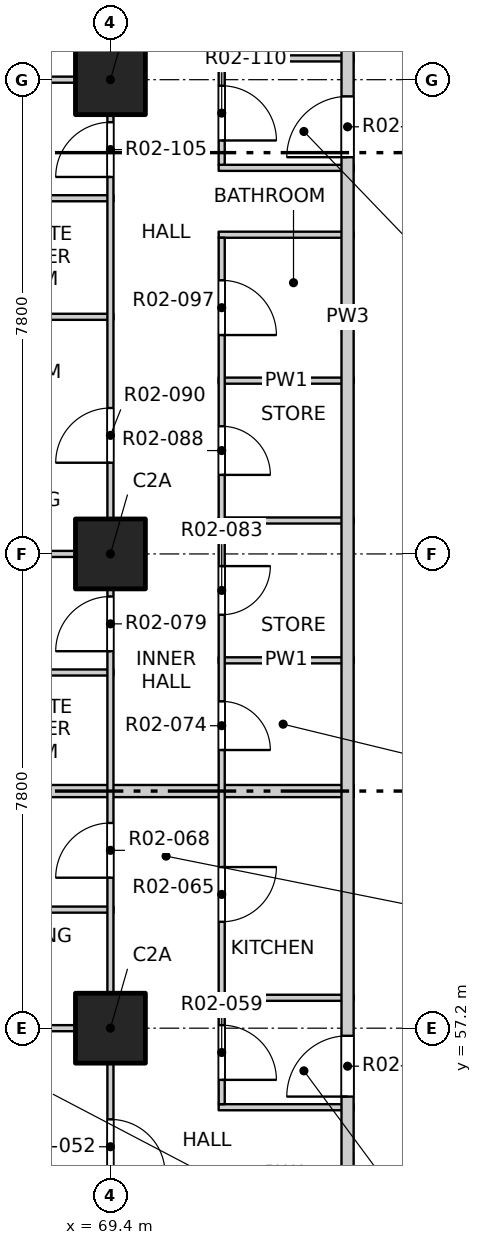
"""IFC4 building model, lengths in metres.
Left out: names, types, materials, properties, quantities, classifications, styles, units other than length and angle.
Written with IfcOpenShell. Run it as: python <this file> out.ifc"""

import sys

from ifc_helpers import new_model, si_unit, direction, frame, frame_2d, origin, origin_2d, place, context, subcontext, project, spatial, rectangle, extrude, element, fill, save


model = new_model("IFC4")
c1 = context("Model", 3, precision=1e-05, world=origin(), true_north=direction((0.0, 1.0)))
c2 = subcontext(c1, "Body", "Model", "MODEL_VIEW")
j1 = project(units=[si_unit("LENGTHUNIT", "METRE"), si_unit("PLANEANGLEUNIT", "RADIAN")], contexts=[c1])
p1 = place(None, origin())
s1 = spatial("IfcSite", under=j1, at=p1, CompositionType="ELEMENT")
p2 = place(p1, origin())
s2 = spatial("IfcBuilding", under=s1, at=p2, CompositionType="ELEMENT")
p3 = place(p2, frame((0.0, 0.0, 29.7)))
s3 = spatial("IfcBuildingStorey", under=s2, at=p3, CompositionType="ELEMENT", Elevation=29.7)
for number, where, z_axis, x_axis in (
    (1, (69.4, 57.2, -0.25), (0.0, 0.0, 1.0), (1.0, 0.0, 0.0)),
    (2, (69.4, 65.0, -0.25), (0.0, 0.0, 1.0), (1.0, 0.0, 0.0)),
    (3, (69.4, 72.8, -0.25), (0.0, 0.0, 1.0), (1.0, 0.0, 0.0)),
):
    element("IfcColumn", number, at=place(p3, frame(where, z_axis=z_axis, x_axis=x_axis)), inside=s3, PredefinedType="COLUMN", context=c2, shape_type="SweptSolid", body=[
        extrude(rectangle(XDim=1.15, YDim=1.15, at=origin_2d()), origin(), (0.0, 0.0, 1.0), 3.4),
    ])
p4 = place(p3, frame((71.18, 55.9, 0.0), z_axis=(0.0, 0.0, 1.0), x_axis=(1.0, 0.0, 0.0)))
e4 = element("IfcWall", 4, at=p4, inside=s3, PredefinedType="PARTITIONING", context=c2, shape_type="SweptSolid", body=[
    extrude(rectangle(XDim=2.22, YDim=0.1, at=frame_2d((1.11, 0.0))), origin(), (0.0, 0.0, 1.0), 3.15),
])
p5 = place(p3, frame((61.9, 57.2, 0.0), z_axis=(0.0, 0.0, 1.0), x_axis=(1.0, 0.0, 0.0)))
e5 = element("IfcWall", 5, at=p5, inside=s3, PredefinedType="PARTITIONING", context=c2, shape_type="SweptSolid", body=[
    extrude(rectangle(XDim=7.55, YDim=0.1, at=frame_2d((3.775, 0.0))), origin(), (0.0, 0.0, 1.0), 2.55),
])
p6 = place(p3, frame((71.18, 57.7, 0.0), z_axis=(0.0, 0.0, 1.0), x_axis=(1.0, 0.0, 0.0)))
e6 = element("IfcWall", 6, at=p6, inside=s3, PredefinedType="PARTITIONING", context=c2, shape_type="SweptSolid", body=[
    extrude(rectangle(XDim=2.22, YDim=0.1, at=frame_2d((1.11, 0.0))), origin(), (0.0, 0.0, 1.0), 3.15),
])
p7 = place(p3, frame((66.05, 59.15, 0.0), z_axis=(0.0, 0.0, 1.0), x_axis=(1.0, 0.0, 0.0)))
e7 = element("IfcWall", 7, at=p7, inside=s3, PredefinedType="PARTITIONING", context=c2, shape_type="SweptSolid", body=[
    extrude(rectangle(XDim=3.4, YDim=0.1, at=frame_2d((1.7, 0.0))), origin(), (0.0, 0.0, 1.0), 3.15),
])
p8 = place(p3, frame((61.9, 61.1, 0.0), z_axis=(0.0, 0.0, 1.0), x_axis=(1.0, 0.0, 0.0)))
e8 = element("IfcWall", 8, at=p8, inside=s3, PredefinedType="PARTITIONING", context=c2, shape_type="SweptSolid", body=[
    extrude(rectangle(XDim=11.5, YDim=0.2, at=frame_2d((5.75, 0.0))), origin(), (0.0, 0.0, 1.0), 3.15),
])
p9 = place(p3, frame((66.05, 63.05, 0.0), z_axis=(0.0, 0.0, 1.0), x_axis=(1.0, 0.0, 0.0)))
e9 = element("IfcWall", 9, at=p9, inside=s3, PredefinedType="PARTITIONING", context=c2, shape_type="SweptSolid", body=[
    extrude(rectangle(XDim=3.4, YDim=0.1, at=frame_2d((1.7, 0.0))), origin(), (0.0, 0.0, 1.0), 3.15),
])
p10 = place(p3, frame((71.18, 63.25, 0.0), z_axis=(0.0, 0.0, 1.0), x_axis=(1.0, 0.0, 0.0)))
e10 = element("IfcWall", 10, at=p10, inside=s3, PredefinedType="PARTITIONING", context=c2, shape_type="SweptSolid", body=[
    extrude(rectangle(XDim=2.22, YDim=0.1, at=frame_2d((1.11, 0.0))), origin(), (0.0, 0.0, 1.0), 3.15),
])
p11 = place(p3, frame((61.9, 65.0, 0.0), z_axis=(0.0, 0.0, 1.0), x_axis=(1.0, 0.0, 0.0)))
e11 = element("IfcWall", 11, at=p11, inside=s3, PredefinedType="PARTITIONING", context=c2, shape_type="SweptSolid", body=[
    extrude(rectangle(XDim=7.55, YDim=0.1, at=frame_2d((3.775, 0.0))), origin(), (0.0, 0.0, 1.0), 2.55),
])
for number, where, z_axis, x_axis in (
    (12, (71.18, 65.55, 0.0), (0.0, 0.0, 1.0), (1.0, 0.0, 0.0)),
    (13, (71.18, 67.85, 0.0), (0.0, 0.0, 1.0), (1.0, 0.0, 0.0)),
):
    element("IfcWall", number, at=place(p3, frame(where, z_axis=z_axis, x_axis=x_axis)), inside=s3, PredefinedType="PARTITIONING", context=c2, shape_type="SweptSolid", body=[
        extrude(rectangle(XDim=2.22, YDim=0.1, at=frame_2d((1.11, 0.0))), origin(), (0.0, 0.0, 1.0), 3.15),
    ])
p12 = place(p3, frame((61.9, 68.9, 0.0), z_axis=(0.0, 0.0, 1.0), x_axis=(1.0, 0.0, 0.0)))
e14 = element("IfcWall", 14, at=p12, inside=s3, PredefinedType="PARTITIONING", context=c2, shape_type="SweptSolid", body=[
    extrude(rectangle(XDim=7.55, YDim=0.1, at=frame_2d((3.775, 0.0))), origin(), (0.0, 0.0, 1.0), 3.15),
])
p13 = place(p3, frame((71.18, 70.25, 0.0), z_axis=(0.0, 0.0, 1.0), x_axis=(1.0, 0.0, 0.0)))
e15 = element("IfcWall", 15, at=p13, inside=s3, PredefinedType="PARTITIONING", context=c2, shape_type="SweptSolid", body=[
    extrude(rectangle(XDim=2.22, YDim=0.1, at=frame_2d((1.11, 0.0))), origin(), (0.0, 0.0, 1.0), 3.15),
])
p14 = place(p3, frame((66.05, 70.85, 0.0), z_axis=(0.0, 0.0, 1.0), x_axis=(1.0, 0.0, 0.0)))
e16 = element("IfcWall", 16, at=p14, inside=s3, PredefinedType="PARTITIONING", context=c2, shape_type="SweptSolid", body=[
    extrude(rectangle(XDim=3.4, YDim=0.1, at=frame_2d((1.7, 0.0))), origin(), (0.0, 0.0, 1.0), 3.15),
])
p15 = place(p3, frame((71.18, 71.35, 0.0), z_axis=(0.0, 0.0, 1.0), x_axis=(1.0, 0.0, 0.0)))
e17 = element("IfcWall", 17, at=p15, inside=s3, PredefinedType="PARTITIONING", context=c2, shape_type="SweptSolid", body=[
    extrude(rectangle(XDim=2.22, YDim=0.1, at=frame_2d((1.11, 0.0))), origin(), (0.0, 0.0, 1.0), 3.15),
])
p16 = place(p3, frame((61.9, 72.8, 0.0), z_axis=(0.0, 0.0, 1.0), x_axis=(1.0, 0.0, 0.0)))
e18 = element("IfcWall", 18, at=p16, inside=s3, PredefinedType="PARTITIONING", context=c2, shape_type="SweptSolid", body=[
    extrude(rectangle(XDim=7.55, YDim=0.1, at=frame_2d((3.775, 0.0))), origin(), (0.0, 0.0, 1.0), 2.55),
])
p17 = place(p3, frame((71.18, 73.15, 0.0), z_axis=(0.0, 0.0, 1.0), x_axis=(1.0, 0.0, 0.0)))
e19 = element("IfcWall", 19, at=p17, inside=s3, PredefinedType="PARTITIONING", context=c2, shape_type="SweptSolid", body=[
    extrude(rectangle(XDim=2.22, YDim=0.1, at=frame_2d((1.11, 0.0))), origin(), (0.0, 0.0, 1.0), 3.15),
])
p18 = place(p3, frame((69.4, 49.4, 0.0), z_axis=(0.0, 0.0, 1.0), x_axis=(0.0, 1.0, 0.0)))
e20 = element("IfcWall", 20, at=p18, inside=s3, PredefinedType="PARTITIONING", context=c2, shape_type="SweptSolid", body=[
    extrude(rectangle(XDim=31.2, YDim=0.1, at=frame_2d((15.6, 0.0))), origin(), (0.0, 0.0, 1.0), 3.15),
])
p19 = place(p18, frame((2.475, 0.0, 0.0)))
e21 = element("IfcOpeningElement", 21, at=p19, cuts=e20, PredefinedType="OPENING", context=c2, shape_type="SweptSolid", body=[
    extrude(rectangle(XDim=0.9, YDim=2.1, at=frame_2d((0.45, 1.05))), frame((0.0, 0.06, 0.0), z_axis=(0.0, -1.0, 0.0), x_axis=(1.0, 0.0, 0.0)), (0.0, 0.0, 1.0), 0.12),
])
p20 = place(p18, frame((5.4, 0.0, 0.0)))
e22 = element("IfcOpeningElement", 22, at=p20, cuts=e20, PredefinedType="OPENING", context=c2, shape_type="SweptSolid", body=[
    extrude(rectangle(XDim=0.9, YDim=2.1, at=frame_2d((0.45, 1.05))), frame((0.0, 0.06, 0.0), z_axis=(0.0, -1.0, 0.0), x_axis=(1.0, 0.0, 0.0)), (0.0, 0.0, 1.0), 0.12),
])
p21 = place(p18, frame((10.275, 0.0, 0.0)))
e23 = element("IfcOpeningElement", 23, at=p21, cuts=e20, PredefinedType="OPENING", context=c2, shape_type="SweptSolid", body=[
    extrude(rectangle(XDim=0.9, YDim=2.1, at=frame_2d((0.45, 1.05))), frame((0.0, 0.06, 0.0), z_axis=(0.0, -1.0, 0.0), x_axis=(1.0, 0.0, 0.0)), (0.0, 0.0, 1.0), 0.12),
])
p22 = place(p18, frame((14.0, 0.0, 0.0)))
e24 = element("IfcOpeningElement", 24, at=p22, cuts=e20, PredefinedType="OPENING", context=c2, shape_type="SweptSolid", body=[
    extrude(rectangle(XDim=0.9, YDim=2.1, at=frame_2d((0.45, 1.05))), frame((0.0, 0.06, 0.0), z_axis=(0.0, -1.0, 0.0), x_axis=(1.0, 0.0, 0.0)), (0.0, 0.0, 1.0), 0.12),
])
p23 = place(p18, frame((17.1, 0.0, 0.0)))
e25 = element("IfcOpeningElement", 25, at=p23, cuts=e20, PredefinedType="OPENING", context=c2, shape_type="SweptSolid", body=[
    extrude(rectangle(XDim=0.9, YDim=2.1, at=frame_2d((0.45, 1.05))), frame((0.0, 0.06, 0.0), z_axis=(0.0, -1.0, 0.0), x_axis=(1.0, 0.0, 0.0)), (0.0, 0.0, 1.0), 0.12),
])
p24 = place(p18, frame((21.8, 0.0, 0.0)))
e26 = element("IfcOpeningElement", 26, at=p24, cuts=e20, PredefinedType="OPENING", context=c2, shape_type="SweptSolid", body=[
    extrude(rectangle(XDim=0.9, YDim=2.1, at=frame_2d((0.45, 1.05))), frame((0.0, 0.06, 0.0), z_axis=(0.0, -1.0, 0.0), x_axis=(1.0, 0.0, 0.0)), (0.0, 0.0, 1.0), 0.12),
])
p25 = place(p18, frame((25.875, 0.0, 0.0)))
e27 = element("IfcOpeningElement", 27, at=p25, cuts=e20, PredefinedType="OPENING", context=c2, shape_type="SweptSolid", body=[
    extrude(rectangle(XDim=0.9, YDim=2.1, at=frame_2d((0.45, 1.05))), frame((0.0, 0.06, 0.0), z_axis=(0.0, -1.0, 0.0), x_axis=(1.0, 0.0, 0.0)), (0.0, 0.0, 1.0), 0.12),
])
p26 = place(p18, frame((29.6, 0.0, 0.0)))
e28 = element("IfcOpeningElement", 28, at=p26, cuts=e20, PredefinedType="OPENING", context=c2, shape_type="SweptSolid", body=[
    extrude(rectangle(XDim=0.9, YDim=2.1, at=frame_2d((0.45, 1.05))), frame((0.0, 0.06, 0.0), z_axis=(0.0, -1.0, 0.0), x_axis=(1.0, 0.0, 0.0)), (0.0, 0.0, 1.0), 0.12),
])
p27 = place(p3, frame((71.23, 55.95, 0.0), z_axis=(0.0, 0.0, 1.0), x_axis=(0.0, 1.0, 0.0)))
e29 = element("IfcWall", 29, at=p27, inside=s3, PredefinedType="PARTITIONING", context=c2, shape_type="SweptSolid", body=[
    extrude(rectangle(XDim=14.25, YDim=0.1, at=frame_2d((7.125, 0.0))), origin(), (0.0, 0.0, 1.0), 3.15),
])
p28 = place(p27, frame((0.4, 0.0, 0.0)))
e30 = element("IfcOpeningElement", 30, at=p28, cuts=e29, PredefinedType="OPENING", context=c2, shape_type="SweptSolid", body=[
    extrude(rectangle(XDim=0.9, YDim=2.1, at=frame_2d((0.45, 1.05))), frame((0.0, 0.06, 0.0), z_axis=(0.0, -1.0, 0.0), x_axis=(1.0, 0.0, 0.0)), (0.0, 0.0, 1.0), 0.12),
])
p29 = place(p27, frame((3.0, 0.0, 0.0)))
e31 = element("IfcOpeningElement", 31, at=p29, cuts=e29, PredefinedType="OPENING", context=c2, shape_type="SweptSolid", body=[
    extrude(rectangle(XDim=0.9, YDim=2.1, at=frame_2d((0.45, 1.05))), frame((0.0, 0.06, 0.0), z_axis=(0.0, -1.0, 0.0), x_axis=(1.0, 0.0, 0.0)), (0.0, 0.0, 1.0), 0.12),
])
p30 = place(p27, frame((5.825, 0.0, 0.0)))
e32 = element("IfcOpeningElement", 32, at=p30, cuts=e29, PredefinedType="OPENING", context=c2, shape_type="SweptSolid", body=[
    extrude(rectangle(XDim=0.8, YDim=2.1, at=frame_2d((0.4, 1.05))), frame((0.0, 0.06, 0.0), z_axis=(0.0, -1.0, 0.0), x_axis=(1.0, 0.0, 0.0)), (0.0, 0.0, 1.0), 0.12),
])
p31 = place(p27, frame((8.05, 0.0, 0.0)))
e33 = element("IfcOpeningElement", 33, at=p31, cuts=e29, PredefinedType="OPENING", context=c2, shape_type="SweptSolid", body=[
    extrude(rectangle(XDim=0.8, YDim=2.1, at=frame_2d((0.4, 1.05))), frame((0.0, 0.06, 0.0), z_axis=(0.0, -1.0, 0.0), x_axis=(1.0, 0.0, 0.0)), (0.0, 0.0, 1.0), 0.12),
])
p32 = place(p27, frame((10.35, 0.0, 0.0)))
e34 = element("IfcOpeningElement", 34, at=p32, cuts=e29, PredefinedType="OPENING", context=c2, shape_type="SweptSolid", body=[
    extrude(rectangle(XDim=0.8, YDim=2.1, at=frame_2d((0.4, 1.05))), frame((0.0, 0.06, 0.0), z_axis=(0.0, -1.0, 0.0), x_axis=(1.0, 0.0, 0.0)), (0.0, 0.0, 1.0), 0.12),
])
p33 = place(p27, frame((12.65, 0.0, 0.0)))
e35 = element("IfcOpeningElement", 35, at=p33, cuts=e29, PredefinedType="OPENING", context=c2, shape_type="SweptSolid", body=[
    extrude(rectangle(XDim=0.9, YDim=2.1, at=frame_2d((0.45, 1.05))), frame((0.0, 0.06, 0.0), z_axis=(0.0, -1.0, 0.0), x_axis=(1.0, 0.0, 0.0)), (0.0, 0.0, 1.0), 0.12),
])
p34 = place(p3, frame((71.23, 71.4, 0.0), z_axis=(0.0, 0.0, 1.0), x_axis=(0.0, 1.0, 0.0)))
e36 = element("IfcWall", 36, at=p34, inside=s3, PredefinedType="PARTITIONING", context=c2, shape_type="SweptSolid", body=[
    extrude(rectangle(XDim=6.7, YDim=0.1, at=frame_2d((3.35, 0.0))), origin(), (0.0, 0.0, 1.0), 3.15),
])
p35 = place(p34, frame((0.4, 0.0, 0.0)))
e37 = element("IfcOpeningElement", 37, at=p35, cuts=e36, PredefinedType="OPENING", context=c2, shape_type="SweptSolid", body=[
    extrude(rectangle(XDim=0.9, YDim=2.1, at=frame_2d((0.45, 1.05))), frame((0.0, 0.06, 0.0), z_axis=(0.0, -1.0, 0.0), x_axis=(1.0, 0.0, 0.0)), (0.0, 0.0, 1.0), 0.12),
])
p36 = place(p34, frame((3.075, 0.0, 0.0)))
e38 = element("IfcOpeningElement", 38, at=p36, cuts=e36, PredefinedType="OPENING", context=c2, shape_type="SweptSolid", body=[
    extrude(rectangle(XDim=0.9, YDim=2.1, at=frame_2d((0.45, 1.05))), frame((0.0, 0.06, 0.0), z_axis=(0.0, -1.0, 0.0), x_axis=(1.0, 0.0, 0.0)), (0.0, 0.0, 1.0), 0.12),
])
p37 = place(p34, frame((5.575, 0.0, 0.0)))
e39 = element("IfcOpeningElement", 39, at=p37, cuts=e36, PredefinedType="OPENING", context=c2, shape_type="SweptSolid", body=[
    extrude(rectangle(XDim=0.9, YDim=2.1, at=frame_2d((0.45, 1.05))), frame((0.0, 0.06, 0.0), z_axis=(0.0, -1.0, 0.0), x_axis=(1.0, 0.0, 0.0)), (0.0, 0.0, 1.0), 0.12),
])
p38 = place(p3, frame((73.3, 53.4, 0.0), z_axis=(0.0, 0.0, 1.0), x_axis=(0.0, 1.0, 0.0)))
e40 = element("IfcWall", 40, at=p38, inside=s3, PredefinedType="PARTITIONING", context=c2, shape_type="SweptSolid", body=[
    extrude(rectangle(XDim=31.0, YDim=0.2, at=frame_2d((15.5, 0.0))), origin(), (0.0, 0.0, 1.0), 3.15),
])
p39 = place(p38, frame((2.675, 0.0, 0.0)))
e41 = element("IfcOpeningElement", 41, at=p39, cuts=e40, PredefinedType="OPENING", context=c2, shape_type="SweptSolid", body=[
    extrude(rectangle(XDim=1.0, YDim=2.1, at=frame_2d((0.5, 1.05))), frame((0.0, 0.11, 0.0), z_axis=(0.0, -1.0, 0.0), x_axis=(1.0, 0.0, 0.0)), (0.0, 0.0, 1.0), 0.22),
])
p40 = place(p38, frame((18.125, 0.0, 0.0)))
e42 = element("IfcOpeningElement", 42, at=p40, cuts=e40, PredefinedType="OPENING", context=c2, shape_type="SweptSolid", body=[
    extrude(rectangle(XDim=1.0, YDim=2.1, at=frame_2d((0.5, 1.05))), frame((0.0, 0.11, 0.0), z_axis=(0.0, -1.0, 0.0), x_axis=(1.0, 0.0, 0.0)), (0.0, 0.0, 1.0), 0.22),
])
p41 = place(p38, frame((26.025, 0.0, 0.0)))
e43 = element("IfcOpeningElement", 43, at=p41, cuts=e40, PredefinedType="OPENING", context=c2, shape_type="SweptSolid", body=[
    extrude(rectangle(XDim=1.0, YDim=2.1, at=frame_2d((0.5, 1.05))), frame((0.0, 0.11, 0.0), z_axis=(0.0, -1.0, 0.0), x_axis=(1.0, 0.0, 0.0)), (0.0, 0.0, 1.0), 0.22),
])
p42 = place(p20, origin())
e44 = element("IfcDoor", 44, at=p42, inside=s3, OperationType="SINGLE_SWING_RIGHT", PredefinedType="DOOR", context=c2, shape_type="SweptSolid", body=[
    extrude(rectangle(XDim=0.9, YDim=2.1, at=frame_2d((0.45, 1.05))), frame((0.0, 0.025, 0.0), z_axis=(0.0, -1.0, 0.0), x_axis=(1.0, 0.0, 0.0)), (0.0, 0.0, 1.0), 0.05),
])
fill(e22, e44)
p43 = place(p39, origin())
e45 = element("IfcDoor", 45, at=p43, inside=s3, OperationType="SINGLE_SWING_RIGHT", PredefinedType="DOOR", context=c2, shape_type="SweptSolid", body=[
    extrude(rectangle(XDim=1.0, YDim=2.1, at=frame_2d((0.5, 1.05))), frame((0.0, 0.025, 0.0), z_axis=(0.0, -1.0, 0.0), x_axis=(1.0, 0.0, 0.0)), (0.0, 0.0, 1.0), 0.05),
])
fill(e41, e45)
p44 = place(p28, origin())
e46 = element("IfcDoor", 46, at=p44, inside=s3, OperationType="SINGLE_SWING_RIGHT", PredefinedType="DOOR", context=c2, shape_type="SweptSolid", body=[
    extrude(rectangle(XDim=0.9, YDim=2.1, at=frame_2d((0.45, 1.05))), frame((0.0, 0.025, 0.0), z_axis=(0.0, -1.0, 0.0), x_axis=(1.0, 0.0, 0.0)), (0.0, 0.0, 1.0), 0.05),
])
fill(e30, e46)
p45 = place(p29, origin())
e47 = element("IfcDoor", 47, at=p45, inside=s3, OperationType="SINGLE_SWING_LEFT", PredefinedType="DOOR", context=c2, shape_type="SweptSolid", body=[
    extrude(rectangle(XDim=0.9, YDim=2.1, at=frame_2d((0.45, 1.05))), frame((0.0, 0.025, 0.0), z_axis=(0.0, -1.0, 0.0), x_axis=(1.0, 0.0, 0.0)), (0.0, 0.0, 1.0), 0.05),
])
fill(e31, e47)
p46 = place(p21, origin())
e48 = element("IfcDoor", 48, at=p46, inside=s3, OperationType="SINGLE_SWING_LEFT", PredefinedType="DOOR", context=c2, shape_type="SweptSolid", body=[
    extrude(rectangle(XDim=0.9, YDim=2.1, at=frame_2d((0.45, 1.05))), frame((0.0, 0.025, 0.0), z_axis=(0.0, -1.0, 0.0), x_axis=(1.0, 0.0, 0.0)), (0.0, 0.0, 1.0), 0.05),
])
fill(e23, e48)
p47 = place(p30, origin())
e49 = element("IfcDoor", 49, at=p47, inside=s3, OperationType="SINGLE_SWING_RIGHT", PredefinedType="DOOR", context=c2, shape_type="SweptSolid", body=[
    extrude(rectangle(XDim=0.8, YDim=2.1, at=frame_2d((0.4, 1.05))), frame((0.0, 0.025, 0.0), z_axis=(0.0, -1.0, 0.0), x_axis=(1.0, 0.0, 0.0)), (0.0, 0.0, 1.0), 0.05),
])
fill(e32, e49)
p48 = place(p22, origin())
e50 = element("IfcDoor", 50, at=p48, inside=s3, OperationType="SINGLE_SWING_LEFT", PredefinedType="DOOR", context=c2, shape_type="SweptSolid", body=[
    extrude(rectangle(XDim=0.9, YDim=2.1, at=frame_2d((0.45, 1.05))), frame((0.0, 0.025, 0.0), z_axis=(0.0, -1.0, 0.0), x_axis=(1.0, 0.0, 0.0)), (0.0, 0.0, 1.0), 0.05),
])
fill(e24, e50)
p49 = place(p31, origin())
e51 = element("IfcDoor", 51, at=p49, inside=s3, OperationType="SINGLE_SWING_LEFT", PredefinedType="DOOR", context=c2, shape_type="SweptSolid", body=[
    extrude(rectangle(XDim=0.8, YDim=2.1, at=frame_2d((0.4, 1.05))), frame((0.0, 0.025, 0.0), z_axis=(0.0, -1.0, 0.0), x_axis=(1.0, 0.0, 0.0)), (0.0, 0.0, 1.0), 0.05),
])
fill(e33, e51)
p50 = place(p32, origin())
e52 = element("IfcDoor", 52, at=p50, inside=s3, OperationType="SINGLE_SWING_RIGHT", PredefinedType="DOOR", context=c2, shape_type="SweptSolid", body=[
    extrude(rectangle(XDim=0.8, YDim=2.1, at=frame_2d((0.4, 1.05))), frame((0.0, 0.025, 0.0), z_axis=(0.0, -1.0, 0.0), x_axis=(1.0, 0.0, 0.0)), (0.0, 0.0, 1.0), 0.05),
])
fill(e34, e52)
p51 = place(p23, origin())
e53 = element("IfcDoor", 53, at=p51, inside=s3, OperationType="SINGLE_SWING_LEFT", PredefinedType="DOOR", context=c2, shape_type="SweptSolid", body=[
    extrude(rectangle(XDim=0.9, YDim=2.1, at=frame_2d((0.45, 1.05))), frame((0.0, 0.025, 0.0), z_axis=(0.0, -1.0, 0.0), x_axis=(1.0, 0.0, 0.0)), (0.0, 0.0, 1.0), 0.05),
])
fill(e25, e53)
p52 = place(p33, origin())
e54 = element("IfcDoor", 54, at=p52, inside=s3, OperationType="SINGLE_SWING_RIGHT", PredefinedType="DOOR", context=c2, shape_type="SweptSolid", body=[
    extrude(rectangle(XDim=0.9, YDim=2.1, at=frame_2d((0.45, 1.05))), frame((0.0, 0.025, 0.0), z_axis=(0.0, -1.0, 0.0), x_axis=(1.0, 0.0, 0.0)), (0.0, 0.0, 1.0), 0.05),
])
fill(e35, e54)
p53 = place(p24, origin())
e55 = element("IfcDoor", 55, at=p53, inside=s3, OperationType="SINGLE_SWING_LEFT", PredefinedType="DOOR", context=c2, shape_type="SweptSolid", body=[
    extrude(rectangle(XDim=0.9, YDim=2.1, at=frame_2d((0.45, 1.05))), frame((0.0, 0.025, 0.0), z_axis=(0.0, -1.0, 0.0), x_axis=(1.0, 0.0, 0.0)), (0.0, 0.0, 1.0), 0.05),
])
fill(e26, e55)
p54 = place(p40, origin())
e56 = element("IfcDoor", 56, at=p54, inside=s3, OperationType="SINGLE_SWING_RIGHT", PredefinedType="DOOR", context=c2, shape_type="SweptSolid", body=[
    extrude(rectangle(XDim=1.0, YDim=2.1, at=frame_2d((0.5, 1.05))), frame((0.0, 0.025, 0.0), z_axis=(0.0, -1.0, 0.0), x_axis=(1.0, 0.0, 0.0)), (0.0, 0.0, 1.0), 0.05),
])
fill(e42, e56)
p55 = place(p35, origin())
e57 = element("IfcDoor", 57, at=p55, inside=s3, OperationType="SINGLE_SWING_RIGHT", PredefinedType="DOOR", context=c2, shape_type="SweptSolid", body=[
    extrude(rectangle(XDim=0.9, YDim=2.1, at=frame_2d((0.45, 1.05))), frame((0.0, 0.025, 0.0), z_axis=(0.0, -1.0, 0.0), x_axis=(1.0, 0.0, 0.0)), (0.0, 0.0, 1.0), 0.05),
])
fill(e37, e57)
save(model, sys.argv[1])
